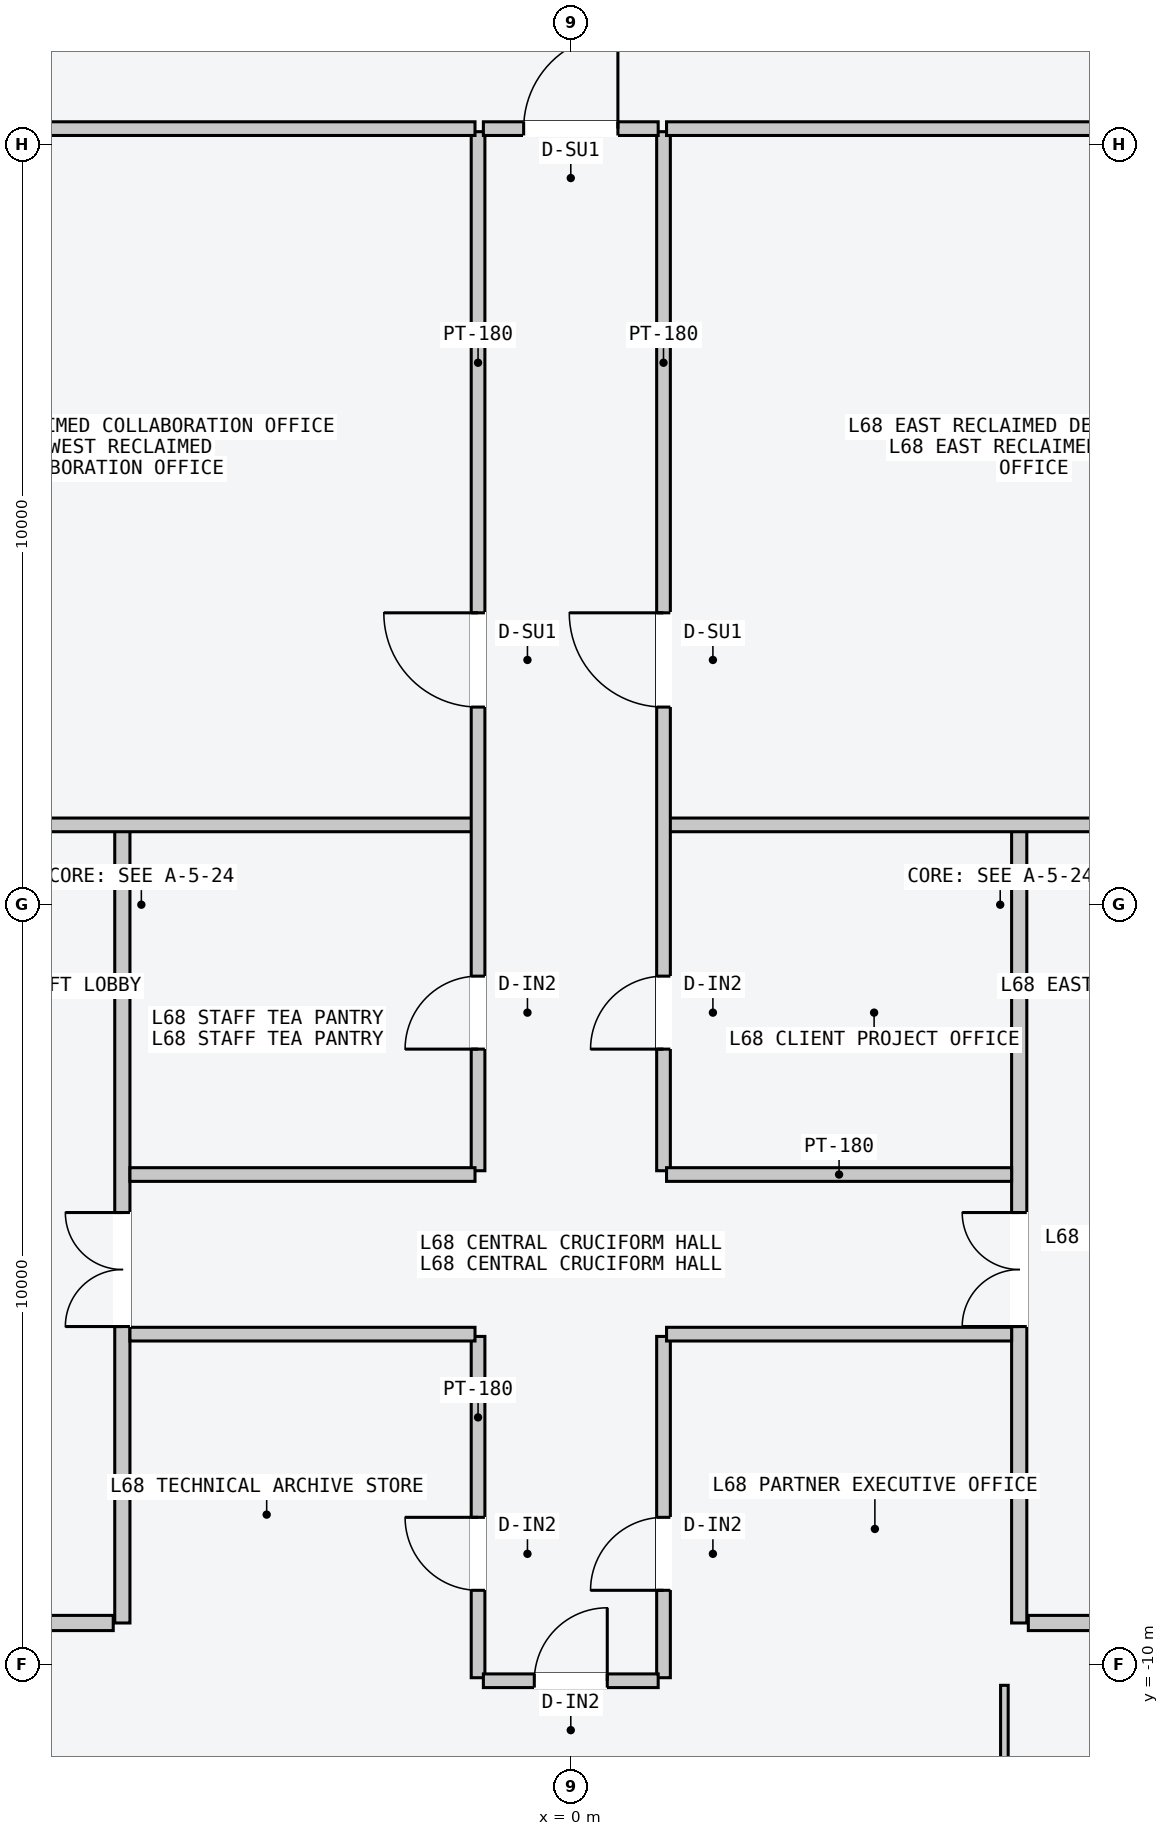
"""IFC4 building model, lengths in metres.
Left out: names, types, materials, properties, quantities, classifications, styles, units other than length and angle.
Written with IfcOpenShell. Run it as: python <this file> out.ifc"""

import sys

from ifc_helpers import new_model, si_unit, direction, frame, frame_2d, origin, place, context, subcontext, project, spatial, rectangle, extrude, element, fill, save


model = new_model("IFC4")
c1 = context("Model", 3, precision=1e-05, world=origin(), true_north=direction((0.0, 1.0)))
c2 = subcontext(c1, "Body", "Model", "MODEL_VIEW")
j1 = project(units=[si_unit("LENGTHUNIT", "METRE"), si_unit("PLANEANGLEUNIT", "RADIAN")], contexts=[c1])
p1 = place(None, origin())
s1 = spatial("IfcSite", under=j1, at=p1, CompositionType="ELEMENT")
p2 = place(p1, origin())
s2 = spatial("IfcBuilding", under=s1, at=p2, CompositionType="ELEMENT")
p3 = place(p2, frame((0.0, 0.0, 258.0)))
s3 = spatial("IfcBuildingStorey", under=s2, at=p3, CompositionType="ELEMENT", Elevation=258.0)
p4 = place(p3, frame((-5.9, -9.45, 0.0), z_axis=(0.0, 0.0, 1.0), x_axis=(0.0, 1.0, 0.0)))
e1 = element("IfcWall", 1, at=p4, inside=s3, PredefinedType="PARTITIONING", context=c2, shape_type="SweptSolid", body=[
    extrude(rectangle(XDim=10.5, YDim=0.2, at=frame_2d((5.25, 0.0))), origin(), (0.0, 0.0, 1.0), 3.4),
])
p5 = place(p4, frame((3.9, 0.0, 0.0)))
e2 = element("IfcOpeningElement", 2, at=p5, cuts=e1, PredefinedType="OPENING", context=c2, shape_type="SweptSolid", body=[
    extrude(rectangle(XDim=1.5, YDim=2.2, at=frame_2d((0.75, 1.1))), frame((0.0, 0.11, 0.0), z_axis=(0.0, -1.0, 0.0), x_axis=(1.0, 0.0, 0.0)), (0.0, 0.0, 1.0), 0.22),
])
p6 = place(p3, frame((-6.02, -9.45, 0.0), z_axis=(0.0, 0.0, 1.0), x_axis=(-1.0, 0.0, 0.0)))
e3 = element("IfcWall", 3, at=p6, inside=s3, PredefinedType="PARTITIONING", context=c2, shape_type="SweptSolid", body=[
    extrude(rectangle(XDim=1.8, YDim=0.2, at=frame_2d((0.9, 0.0))), origin(), (0.0, 0.0, 1.0), 3.4),
])
p7 = place(p3, frame((5.9, -9.45, 0.0), z_axis=(0.0, 0.0, 1.0), x_axis=(0.0, 1.0, 0.0)))
e4 = element("IfcWall", 4, at=p7, inside=s3, PredefinedType="PARTITIONING", context=c2, shape_type="SweptSolid", body=[
    extrude(rectangle(XDim=10.5, YDim=0.2, at=frame_2d((5.25, 0.0))), origin(), (0.0, 0.0, 1.0), 3.4),
])
p8 = place(p7, frame((3.9, 0.0, 0.0)))
e5 = element("IfcOpeningElement", 5, at=p8, cuts=e4, PredefinedType="OPENING", context=c2, shape_type="SweptSolid", body=[
    extrude(rectangle(XDim=1.5, YDim=2.2, at=frame_2d((0.75, 1.1))), frame((0.0, 0.11, 0.0), z_axis=(0.0, -1.0, 0.0), x_axis=(1.0, 0.0, 0.0)), (0.0, 0.0, 1.0), 0.22),
])
p9 = place(p3, frame((6.02, -9.45, 0.0), z_axis=(0.0, 0.0, 1.0), x_axis=(1.0, 0.0, 0.0)))
e6 = element("IfcWall", 6, at=p9, inside=s3, PredefinedType="PARTITIONING", context=c2, shape_type="SweptSolid", body=[
    extrude(rectangle(XDim=1.8, YDim=0.2, at=frame_2d((0.9, 0.0))), origin(), (0.0, 0.0, 1.0), 3.4),
])
p10 = place(p3, frame((-10.05, 1.05, 0.0), z_axis=(0.0, 0.0, 1.0), x_axis=(1.0, 0.0, 0.0)))
e7 = element("IfcWall", 7, at=p10, inside=s3, PredefinedType="PARTITIONING", context=c2, shape_type="SweptSolid", body=[
    extrude(rectangle(XDim=8.79, YDim=0.18, at=frame_2d((4.395, 0.0))), origin(), (0.0, 0.0, 1.0), 3.4),
])
p11 = place(p3, frame((-1.22, -3.5, 0.0), z_axis=(0.0, 0.0, 1.0), x_axis=(0.0, 1.0, 0.0)))
e8 = element("IfcWall", 8, at=p11, inside=s3, PredefinedType="PARTITIONING", context=c2, shape_type="SweptSolid", body=[
    extrude(rectangle(XDim=13.67, YDim=0.18, at=frame_2d((6.835, 0.0))), origin(), (0.0, 0.0, 1.0), 3.4),
])
p12 = place(p11, frame((6.1, 0.0, 0.0)))
e9 = element("IfcOpeningElement", 9, at=p12, cuts=e8, PredefinedType="OPENING", context=c2, shape_type="SweptSolid", body=[
    extrude(rectangle(XDim=1.24, YDim=2.24, at=frame_2d((0.62, 1.12))), frame((0.0, 0.1, 0.0), z_axis=(0.0, -1.0, 0.0), x_axis=(1.0, 0.0, 0.0)), (0.0, 0.0, 1.0), 0.2),
])
p13 = place(p11, frame((1.6, 0.0, 0.0)))
e10 = element("IfcOpeningElement", 10, at=p13, cuts=e8, PredefinedType="OPENING", context=c2, shape_type="SweptSolid", body=[
    extrude(rectangle(XDim=0.96, YDim=2.18, at=frame_2d((0.48, 1.09))), frame((0.0, 0.1, 0.0), z_axis=(0.0, -1.0, 0.0), x_axis=(1.0, 0.0, 0.0)), (0.0, 0.0, 1.0), 0.2),
])
p14 = place(p3, frame((-7.5, 10.21, 0.0), z_axis=(0.0, 0.0, 1.0), x_axis=(1.0, 0.0, 0.0)))
e11 = element("IfcWall", 11, at=p14, inside=s3, PredefinedType="PARTITIONING", context=c2, shape_type="SweptSolid", body=[
    extrude(rectangle(XDim=6.24, YDim=0.18, at=frame_2d((3.12, 0.0))), origin(), (0.0, 0.0, 1.0), 3.4),
])
p15 = place(p3, frame((-5.8, -3.55, 0.0), z_axis=(0.0, 0.0, 1.0), x_axis=(1.0, 0.0, 0.0)))
e12 = element("IfcWall", 12, at=p15, inside=s3, PredefinedType="PARTITIONING", context=c2, shape_type="SweptSolid", body=[
    extrude(rectangle(XDim=4.54, YDim=0.18, at=frame_2d((2.27, 0.0))), origin(), (0.0, 0.0, 1.0), 3.4),
])
p16 = place(p3, frame((1.26, 1.05, 0.0), z_axis=(0.0, 0.0, 1.0), x_axis=(1.0, 0.0, 0.0)))
e13 = element("IfcWall", 13, at=p16, inside=s3, PredefinedType="PARTITIONING", context=c2, shape_type="SweptSolid", body=[
    extrude(rectangle(XDim=8.8, YDim=0.18, at=frame_2d((4.4, 0.0))), origin(), (0.0, 0.0, 1.0), 3.4),
])
p17 = place(p3, frame((1.22, -3.5, 0.0), z_axis=(0.0, 0.0, 1.0), x_axis=(0.0, 1.0, 0.0)))
e14 = element("IfcWall", 14, at=p17, inside=s3, PredefinedType="PARTITIONING", context=c2, shape_type="SweptSolid", body=[
    extrude(rectangle(XDim=13.67, YDim=0.18, at=frame_2d((6.835, 0.0))), origin(), (0.0, 0.0, 1.0), 3.4),
])
p18 = place(p17, frame((6.1, 0.0, 0.0)))
e15 = element("IfcOpeningElement", 15, at=p18, cuts=e14, PredefinedType="OPENING", context=c2, shape_type="SweptSolid", body=[
    extrude(rectangle(XDim=1.24, YDim=2.24, at=frame_2d((0.62, 1.12))), frame((0.0, 0.1, 0.0), z_axis=(0.0, -1.0, 0.0), x_axis=(1.0, 0.0, 0.0)), (0.0, 0.0, 1.0), 0.2),
])
p19 = place(p17, frame((1.6, 0.0, 0.0)))
e16 = element("IfcOpeningElement", 16, at=p19, cuts=e14, PredefinedType="OPENING", context=c2, shape_type="SweptSolid", body=[
    extrude(rectangle(XDim=0.96, YDim=2.18, at=frame_2d((0.48, 1.09))), frame((0.0, 0.1, 0.0), z_axis=(0.0, -1.0, 0.0), x_axis=(1.0, 0.0, 0.0)), (0.0, 0.0, 1.0), 0.2),
])
p20 = place(p3, frame((1.26, 10.21, 0.0), z_axis=(0.0, 0.0, 1.0), x_axis=(1.0, 0.0, 0.0)))
e17 = element("IfcWall", 17, at=p20, inside=s3, PredefinedType="PARTITIONING", context=c2, shape_type="SweptSolid", body=[
    extrude(rectangle(XDim=6.24, YDim=0.18, at=frame_2d((3.12, 0.0))), origin(), (0.0, 0.0, 1.0), 3.4),
])
p21 = place(p3, frame((1.26, -3.55, 0.0), z_axis=(0.0, 0.0, 1.0), x_axis=(1.0, 0.0, 0.0)))
e18 = element("IfcWall", 18, at=p21, inside=s3, PredefinedType="PARTITIONING", context=c2, shape_type="SweptSolid", body=[
    extrude(rectangle(XDim=4.54, YDim=0.18, at=frame_2d((2.27, 0.0))), origin(), (0.0, 0.0, 1.0), 3.4),
])
p22 = place(p3, frame((-1.22, -10.17, 0.0), z_axis=(0.0, 0.0, 1.0), x_axis=(0.0, 1.0, 0.0)))
e19 = element("IfcWall", 19, at=p22, inside=s3, PredefinedType="PARTITIONING", context=c2, shape_type="SweptSolid", body=[
    extrude(rectangle(XDim=4.49, YDim=0.18, at=frame_2d((2.245, 0.0))), origin(), (0.0, 0.0, 1.0), 3.4),
])
p23 = place(p22, frame((1.15, 0.0, 0.0)))
e20 = element("IfcOpeningElement", 20, at=p23, cuts=e19, PredefinedType="OPENING", context=c2, shape_type="SweptSolid", body=[
    extrude(rectangle(XDim=0.96, YDim=2.18, at=frame_2d((0.48, 1.09))), frame((0.0, 0.1, 0.0), z_axis=(0.0, -1.0, 0.0), x_axis=(1.0, 0.0, 0.0)), (0.0, 0.0, 1.0), 0.2),
])
p24 = place(p3, frame((1.22, -10.17, 0.0), z_axis=(0.0, 0.0, 1.0), x_axis=(0.0, 1.0, 0.0)))
e21 = element("IfcWall", 21, at=p24, inside=s3, PredefinedType="PARTITIONING", context=c2, shape_type="SweptSolid", body=[
    extrude(rectangle(XDim=4.49, YDim=0.18, at=frame_2d((2.245, 0.0))), origin(), (0.0, 0.0, 1.0), 3.4),
])
p25 = place(p24, frame((1.15, 0.0, 0.0)))
e22 = element("IfcOpeningElement", 22, at=p25, cuts=e21, PredefinedType="OPENING", context=c2, shape_type="SweptSolid", body=[
    extrude(rectangle(XDim=0.96, YDim=2.18, at=frame_2d((0.48, 1.09))), frame((0.0, 0.1, 0.0), z_axis=(0.0, -1.0, 0.0), x_axis=(1.0, 0.0, 0.0)), (0.0, 0.0, 1.0), 0.2),
])
for number, where, z_axis, x_axis in (
    (23, (-5.8, -5.65, 0.0), (0.0, 0.0, 1.0), (1.0, 0.0, 0.0)),
    (24, (1.26, -5.65, 0.0), (0.0, 0.0, 1.0), (1.0, 0.0, 0.0)),
):
    element("IfcWall", number, at=place(p3, frame(where, z_axis=z_axis, x_axis=x_axis)), inside=s3, PredefinedType="PARTITIONING", context=c2, shape_type="SweptSolid", body=[
        extrude(rectangle(XDim=4.54, YDim=0.18, at=frame_2d((2.27, 0.0))), origin(), (0.0, 0.0, 1.0), 3.4),
    ])
p26 = place(p3, frame((-1.15, 10.21, 0.0), z_axis=(0.0, 0.0, 1.0), x_axis=(1.0, 0.0, 0.0)))
e25 = element("IfcWall", 25, at=p26, inside=s3, PredefinedType="PARTITIONING", context=c2, shape_type="SweptSolid", body=[
    extrude(rectangle(XDim=2.3, YDim=0.18, at=frame_2d((1.15, 0.0))), origin(), (0.0, 0.0, 1.0), 3.4),
])
p27 = place(p26, frame((0.53, 0.0, 0.0)))
e26 = element("IfcOpeningElement", 26, at=p27, cuts=e25, PredefinedType="OPENING", context=c2, shape_type="SweptSolid", body=[
    extrude(rectangle(XDim=1.24, YDim=2.24, at=frame_2d((0.62, 1.12))), frame((0.0, 0.1, 0.0), z_axis=(0.0, -1.0, 0.0), x_axis=(1.0, 0.0, 0.0)), (0.0, 0.0, 1.0), 0.2),
])
p28 = place(p3, frame((5.705, -17.56, 0.0), z_axis=(0.0, 0.0, 1.0), x_axis=(0.0, 1.0, 0.0)))
e27 = element("IfcWall", 27, at=p28, inside=s3, PredefinedType="PARTITIONING", context=c2, shape_type="SweptSolid", body=[
    extrude(rectangle(XDim=7.29, YDim=0.1, at=frame_2d((3.645, 0.0))), origin(), (0.0, 0.0, 1.0), 3.4),
])
p29 = place(p28, frame((1.05, 0.0, 0.0)))
e28 = element("IfcOpeningElement", 28, at=p29, cuts=e27, PredefinedType="OPENING", context=c2, shape_type="SweptSolid", body=[
    extrude(rectangle(XDim=0.96, YDim=2.18, at=frame_2d((0.48, 1.09))), frame((0.0, 0.06, 0.0), z_axis=(0.0, -1.0, 0.0), x_axis=(1.0, 0.0, 0.0)), (0.0, 0.0, 1.0), 0.12),
])
p30 = place(p3, frame((-1.15, -10.21, 0.0), z_axis=(0.0, 0.0, 1.0), x_axis=(1.0, 0.0, 0.0)))
e29 = element("IfcWall", 29, at=p30, inside=s3, PredefinedType="PARTITIONING", context=c2, shape_type="SweptSolid", body=[
    extrude(rectangle(XDim=2.3, YDim=0.18, at=frame_2d((1.15, 0.0))), origin(), (0.0, 0.0, 1.0), 3.4),
])
p31 = place(p30, frame((0.67, 0.0, 0.0)))
e30 = element("IfcOpeningElement", 30, at=p31, cuts=e29, PredefinedType="OPENING", context=c2, shape_type="SweptSolid", body=[
    extrude(rectangle(XDim=0.96, YDim=2.18, at=frame_2d((0.48, 1.09))), frame((0.0, 0.1, 0.0), z_axis=(0.0, -1.0, 0.0), x_axis=(1.0, 0.0, 0.0)), (0.0, 0.0, 1.0), 0.2),
])
p32 = place(p5, origin())
e31 = element("IfcDoor", 31, at=p32, inside=s3, OperationType="DOUBLE_DOOR_SINGLE_SWING", PredefinedType="DOOR", context=c2, shape_type="SweptSolid", body=[
    extrude(rectangle(XDim=1.5, YDim=2.2, at=frame_2d((0.75, 1.1))), frame((0.0, 0.025, 0.0), z_axis=(0.0, -1.0, 0.0), x_axis=(1.0, 0.0, 0.0)), (0.0, 0.0, 1.0), 0.05),
])
fill(e2, e31)
p33 = place(p8, origin())
e32 = element("IfcDoor", 32, at=p33, inside=s3, OperationType="DOUBLE_DOOR_SINGLE_SWING", PredefinedType="DOOR", context=c2, shape_type="SweptSolid", body=[
    extrude(rectangle(XDim=1.5, YDim=2.2, at=frame_2d((0.75, 1.1))), frame((0.0, 0.025, 0.0), z_axis=(0.0, -1.0, 0.0), x_axis=(1.0, 0.0, 0.0)), (0.0, 0.0, 1.0), 0.05),
])
fill(e5, e32)
p34 = place(p12, origin())
e33 = element("IfcDoor", 33, at=p34, inside=s3, OperationType="SINGLE_SWING_RIGHT", PredefinedType="DOOR", context=c2, shape_type="SweptSolid", body=[
    extrude(rectangle(XDim=1.24, YDim=2.24, at=frame_2d((0.62, 1.12))), frame((0.0, 0.025, 0.0), z_axis=(0.0, -1.0, 0.0), x_axis=(1.0, 0.0, 0.0)), (0.0, 0.0, 1.0), 0.05),
])
fill(e9, e33)
p35 = place(p13, origin())
e34 = element("IfcDoor", 34, at=p35, inside=s3, OperationType="SINGLE_SWING_LEFT", PredefinedType="DOOR", context=c2, shape_type="SweptSolid", body=[
    extrude(rectangle(XDim=0.96, YDim=2.18, at=frame_2d((0.48, 1.09))), frame((0.0, 0.025, 0.0), z_axis=(0.0, -1.0, 0.0), x_axis=(1.0, 0.0, 0.0)), (0.0, 0.0, 1.0), 0.05),
])
fill(e10, e34)
p36 = place(p18, origin())
e35 = element("IfcDoor", 35, at=p36, inside=s3, OperationType="SINGLE_SWING_RIGHT", PredefinedType="DOOR", context=c2, shape_type="SweptSolid", body=[
    extrude(rectangle(XDim=1.24, YDim=2.24, at=frame_2d((0.62, 1.12))), frame((0.0, 0.025, 0.0), z_axis=(0.0, -1.0, 0.0), x_axis=(1.0, 0.0, 0.0)), (0.0, 0.0, 1.0), 0.05),
])
fill(e15, e35)
p37 = place(p19, origin())
e36 = element("IfcDoor", 36, at=p37, inside=s3, OperationType="SINGLE_SWING_LEFT", PredefinedType="DOOR", context=c2, shape_type="SweptSolid", body=[
    extrude(rectangle(XDim=0.96, YDim=2.18, at=frame_2d((0.48, 1.09))), frame((0.0, 0.025, 0.0), z_axis=(0.0, -1.0, 0.0), x_axis=(1.0, 0.0, 0.0)), (0.0, 0.0, 1.0), 0.05),
])
fill(e16, e36)
p38 = place(p23, origin())
e37 = element("IfcDoor", 37, at=p38, inside=s3, OperationType="SINGLE_SWING_RIGHT", PredefinedType="DOOR", context=c2, shape_type="SweptSolid", body=[
    extrude(rectangle(XDim=0.96, YDim=2.18, at=frame_2d((0.48, 1.09))), frame((0.0, 0.025, 0.0), z_axis=(0.0, -1.0, 0.0), x_axis=(1.0, 0.0, 0.0)), (0.0, 0.0, 1.0), 0.05),
])
fill(e20, e37)
p39 = place(p25, origin())
e38 = element("IfcDoor", 38, at=p39, inside=s3, OperationType="SINGLE_SWING_LEFT", PredefinedType="DOOR", context=c2, shape_type="SweptSolid", body=[
    extrude(rectangle(XDim=0.96, YDim=2.18, at=frame_2d((0.48, 1.09))), frame((0.0, 0.025, 0.0), z_axis=(0.0, -1.0, 0.0), x_axis=(1.0, 0.0, 0.0)), (0.0, 0.0, 1.0), 0.05),
])
fill(e22, e38)
p40 = place(p27, origin())
e39 = element("IfcDoor", 39, at=p40, inside=s3, OperationType="SINGLE_SWING_RIGHT", PredefinedType="DOOR", context=c2, shape_type="SweptSolid", body=[
    extrude(rectangle(XDim=1.24, YDim=2.24, at=frame_2d((0.62, 1.12))), frame((0.0, 0.025, 0.0), z_axis=(0.0, -1.0, 0.0), x_axis=(1.0, 0.0, 0.0)), (0.0, 0.0, 1.0), 0.05),
])
fill(e26, e39)
p41 = place(p31, origin())
e40 = element("IfcDoor", 40, at=p41, inside=s3, OperationType="SINGLE_SWING_RIGHT", PredefinedType="DOOR", context=c2, shape_type="SweptSolid", body=[
    extrude(rectangle(XDim=0.96, YDim=2.18, at=frame_2d((0.48, 1.09))), frame((0.0, 0.025, 0.0), z_axis=(0.0, -1.0, 0.0), x_axis=(1.0, 0.0, 0.0)), (0.0, 0.0, 1.0), 0.05),
])
fill(e30, e40)
save(model, sys.argv[1])
